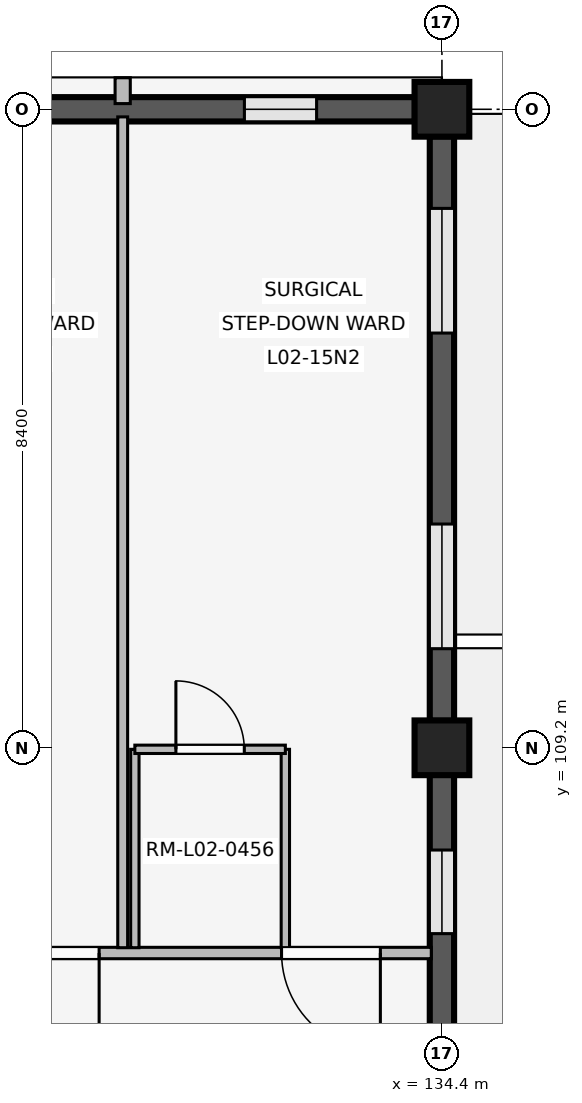
"""IFC4 building model, lengths in metres.
Left out: names, types, materials, properties, quantities, classifications, styles, units other than length and angle.
Written with IfcOpenShell. Run it as: python <this file> out.ifc"""

import sys

from ifc_helpers import new_model, si_unit, direction, frame, frame_2d, origin, origin_2d, place, context, subcontext, project, spatial, rectangle, extrude, element, fill, save


model = new_model("IFC4")
c1 = context("Model", 3, precision=1e-05, world=origin(), true_north=direction((0.0, 1.0)))
c2 = subcontext(c1, "Body", "Model", "MODEL_VIEW")
j1 = project(units=[si_unit("LENGTHUNIT", "METRE"), si_unit("PLANEANGLEUNIT", "RADIAN")], contexts=[c1])
p1 = place(None, origin())
s1 = spatial("IfcSite", under=j1, at=p1, CompositionType="ELEMENT")
p2 = place(p1, origin())
s2 = spatial("IfcBuilding", under=s1, at=p2, CompositionType="ELEMENT")
p3 = place(p2, frame((0.0, 0.0, 8.1)))
s3 = spatial("IfcBuildingStorey", under=s2, at=p3, CompositionType="ELEMENT", Elevation=8.1)
for number, where, z_axis, x_axis in (
    (1, (134.4, 109.2, 0.0), (0.0, 0.0, 1.0), (1.0, 0.0, 0.0)),
    (2, (134.4, 117.6, 0.0), (0.0, 0.0, 1.0), (1.0, 0.0, 0.0)),
):
    element("IfcColumn", number, at=place(p3, frame(where, z_axis=z_axis, x_axis=x_axis)), inside=s3, PredefinedType="COLUMN", context=c2, shape_type="SweptSolid", body=[
        extrude(rectangle(XDim=0.72, YDim=0.72, at=origin_2d()), origin(), (0.0, 0.0, 1.0), 4.8),
    ])
p4 = place(p3, frame((134.4, 108.845, 0.0), z_axis=(0.0, 0.0, 1.0), x_axis=(0.0, -1.0, 0.0)))
e3 = element("IfcWall", 3, at=p4, inside=s3, PredefinedType="SOLIDWALL", context=c2, shape_type="SweptSolid", body=[
    extrude(rectangle(XDim=7.69, YDim=0.32, at=frame_2d((3.845, 0.0))), origin(), (0.0, 0.0, 1.0), 3.86),
])
p5 = place(p4, frame((0.99, 0.0, 0.85)))
e4 = element("IfcOpeningElement", 4, at=p5, cuts=e3, PredefinedType="OPENING", context=c2, shape_type="SweptSolid", body=[
    extrude(rectangle(XDim=1.1, YDim=1.6, at=frame_2d((0.55, 0.8))), frame((0.0, 0.17, 0.0), z_axis=(0.0, -1.0, 0.0), x_axis=(1.0, 0.0, 0.0)), (0.0, 0.0, 1.0), 0.34),
])
p6 = place(p4, frame((5.6, 0.0, 0.85)))
e5 = element("IfcOpeningElement", 5, at=p6, cuts=e3, PredefinedType="OPENING", context=c2, shape_type="SweptSolid", body=[
    extrude(rectangle(XDim=1.1, YDim=1.6, at=frame_2d((0.55, 0.8))), frame((0.0, 0.17, 0.0), z_axis=(0.0, -1.0, 0.0), x_axis=(1.0, 0.0, 0.0)), (0.0, 0.0, 1.0), 0.34),
])
p7 = place(p3, frame((126.355, 117.6, 0.0), z_axis=(0.0, 0.0, 1.0), x_axis=(1.0, 0.0, 0.0)))
e6 = element("IfcWall", 6, at=p7, inside=s3, PredefinedType="SOLIDWALL", context=c2, shape_type="SweptSolid", body=[
    extrude(rectangle(XDim=7.69, YDim=0.32, at=frame_2d((3.845, 0.0))), origin(), (0.0, 0.0, 1.0), 3.86),
])
p8 = place(p7, frame((1.294, 0.0, 0.85)))
e7 = element("IfcOpeningElement", 7, at=p8, cuts=e6, PredefinedType="OPENING", context=c2, shape_type="SweptSolid", body=[
    extrude(rectangle(XDim=0.95, YDim=1.6, at=frame_2d((0.475, 0.8))), frame((0.0, 0.17, 0.0), z_axis=(0.0, -1.0, 0.0), x_axis=(1.0, 0.0, 0.0)), (0.0, 0.0, 1.0), 0.34),
])
p9 = place(p7, frame((5.446, 0.0, 0.85)))
e8 = element("IfcOpeningElement", 8, at=p9, cuts=e6, PredefinedType="OPENING", context=c2, shape_type="SweptSolid", body=[
    extrude(rectangle(XDim=0.95, YDim=1.6, at=frame_2d((0.475, 0.8))), frame((0.0, 0.17, 0.0), z_axis=(0.0, -1.0, 0.0), x_axis=(1.0, 0.0, 0.0)), (0.0, 0.0, 1.0), 0.34),
])
p10 = place(p3, frame((130.2, 117.675, 0.0), z_axis=(0.0, 0.0, 1.0), x_axis=(0.0, 1.0, 0.0)))
e9 = element("IfcWall", 9, at=p10, inside=s3, PredefinedType="ELEMENTEDWALL", context=c2, shape_type="SweptSolid", body=[
    extrude(rectangle(XDim=0.34, YDim=0.2, at=frame_2d((0.17, 0.0))), origin(), (0.0, 0.0, 1.0), 3.84),
])
p11 = place(p3, frame((134.4, 117.245, 0.0), z_axis=(0.0, 0.0, 1.0), x_axis=(0.0, -1.0, 0.0)))
e10 = element("IfcWall", 10, at=p11, inside=s3, PredefinedType="SOLIDWALL", context=c2, shape_type="SweptSolid", body=[
    extrude(rectangle(XDim=7.69, YDim=0.32, at=frame_2d((3.845, 0.0))), origin(), (0.0, 0.0, 1.0), 3.86),
])
p12 = place(p11, frame((0.949, 0.0, 0.85)))
e11 = element("IfcOpeningElement", 11, at=p12, cuts=e10, PredefinedType="OPENING", context=c2, shape_type="SweptSolid", body=[
    extrude(rectangle(XDim=1.64, YDim=1.75, at=frame_2d((0.82, 0.875))), frame((0.0, 0.17, 0.0), z_axis=(0.0, -1.0, 0.0), x_axis=(1.0, 0.0, 0.0)), (0.0, 0.0, 1.0), 0.34),
])
p13 = place(p11, frame((5.101, 0.0, 0.85)))
e12 = element("IfcOpeningElement", 12, at=p13, cuts=e10, PredefinedType="OPENING", context=c2, shape_type="SweptSolid", body=[
    extrude(rectangle(XDim=1.64, YDim=1.75, at=frame_2d((0.82, 0.875))), frame((0.0, 0.17, 0.0), z_axis=(0.0, -1.0, 0.0), x_axis=(1.0, 0.0, 0.0)), (0.0, 0.0, 1.0), 0.34),
])
p14 = place(p3, frame((134.26, 106.5, 0.0), z_axis=(0.0, 0.0, 1.0), x_axis=(-1.0, 0.0, 0.0)))
e13 = element("IfcWall", 13, at=p14, inside=s3, PredefinedType="PARTITIONING", context=c2, shape_type="SweptSolid", body=[
    extrude(rectangle(XDim=8.18, YDim=0.15, at=frame_2d((4.09, 0.0))), origin(), (0.0, 0.0, 1.0), 3.84),
])
p15 = place(p14, frame((0.67, 0.0, 0.0)))
e14 = element("IfcOpeningElement", 14, at=p15, cuts=e13, PredefinedType="OPENING", context=c2, shape_type="SweptSolid", body=[
    extrude(rectangle(XDim=1.3, YDim=2.25, at=frame_2d((0.65, 1.125))), frame((0.0, 0.085, 0.0), z_axis=(0.0, -1.0, 0.0), x_axis=(1.0, 0.0, 0.0)), (0.0, 0.0, 1.0), 0.17),
])
p16 = place(p14, frame((4.37, 0.0, 0.0)))
e15 = element("IfcOpeningElement", 15, at=p16, cuts=e13, PredefinedType="OPENING", context=c2, shape_type="SweptSolid", body=[
    extrude(rectangle(XDim=1.3, YDim=2.25, at=frame_2d((0.65, 1.125))), frame((0.0, 0.085, 0.0), z_axis=(0.0, -1.0, 0.0), x_axis=(1.0, 0.0, 0.0)), (0.0, 0.0, 1.0), 0.17),
])
p17 = place(p3, frame((130.2, 106.57, 0.0), z_axis=(0.0, 0.0, 1.0), x_axis=(0.0, 1.0, 0.0)))
e16 = element("IfcWall", 16, at=p17, inside=s3, PredefinedType="PARTITIONING", context=c2, shape_type="SweptSolid", body=[
    extrude(rectangle(XDim=10.93, YDim=0.13, at=frame_2d((5.465, 0.0))), origin(), (0.0, 0.0, 1.0), 3.84),
])
for number, where, z_axis, x_axis in (
    (17, (130.36, 106.57, 0.0), (0.0, 0.0, 1.0), (0.0, 1.0, 0.0)),
    (18, (132.34, 106.57, 0.0), (0.0, 0.0, 1.0), (0.0, 1.0, 0.0)),
):
    element("IfcWall", number, at=place(p3, frame(where, z_axis=z_axis, x_axis=x_axis)), inside=s3, PredefinedType="PARTITIONING", context=c2, shape_type="SweptSolid", body=[
        extrude(rectangle(XDim=2.61, YDim=0.11, at=frame_2d((1.305, 0.0))), origin(), (0.0, 0.0, 1.0), 3.84),
    ])
p18 = place(p3, frame((130.36, 109.18, 0.0), z_axis=(0.0, 0.0, 1.0), x_axis=(1.0, 0.0, 0.0)))
e19 = element("IfcWall", 19, at=p18, inside=s3, PredefinedType="PARTITIONING", context=c2, shape_type="SweptSolid", body=[
    extrude(rectangle(XDim=1.98, YDim=0.11, at=frame_2d((0.99, 0.0))), origin(), (0.0, 0.0, 1.0), 3.84),
])
p19 = place(p18, frame((0.54, 0.0, 0.0)))
e20 = element("IfcOpeningElement", 20, at=p19, cuts=e19, PredefinedType="OPENING", context=c2, shape_type="SweptSolid", body=[
    extrude(rectangle(XDim=0.9, YDim=2.1, at=frame_2d((0.45, 1.05))), frame((0.0, 0.065, 0.0), z_axis=(0.0, -1.0, 0.0), x_axis=(1.0, 0.0, 0.0)), (0.0, 0.0, 1.0), 0.13),
])
p20 = place(p5, origin())
e21 = element("IfcWindow", 21, at=p20, inside=s3, PartitioningType="SINGLE_PANEL", PredefinedType="WINDOW", context=c2, shape_type="SweptSolid", body=[
    extrude(rectangle(XDim=1.1, YDim=1.6, at=frame_2d((0.55, 0.8))), frame((0.0, 0.03, 0.0), z_axis=(0.0, -1.0, 0.0), x_axis=(1.0, 0.0, 0.0)), (0.0, 0.0, 1.0), 0.06),
])
fill(e4, e21)
p21 = place(p9, origin())
e22 = element("IfcWindow", 22, at=p21, inside=s3, PartitioningType="SINGLE_PANEL", PredefinedType="WINDOW", context=c2, shape_type="SweptSolid", body=[
    extrude(rectangle(XDim=0.95, YDim=1.6, at=frame_2d((0.475, 0.8))), frame((0.0, 0.03, 0.0), z_axis=(0.0, -1.0, 0.0), x_axis=(1.0, 0.0, 0.0)), (0.0, 0.0, 1.0), 0.06),
])
fill(e8, e22)
p22 = place(p12, origin())
e23 = element("IfcWindow", 23, at=p22, inside=s3, PartitioningType="SINGLE_PANEL", PredefinedType="WINDOW", context=c2, shape_type="SweptSolid", body=[
    extrude(rectangle(XDim=1.64, YDim=1.75, at=frame_2d((0.82, 0.875))), frame((0.0, 0.03, 0.0), z_axis=(0.0, -1.0, 0.0), x_axis=(1.0, 0.0, 0.0)), (0.0, 0.0, 1.0), 0.06),
])
fill(e11, e23)
p23 = place(p13, origin())
e24 = element("IfcWindow", 24, at=p23, inside=s3, PartitioningType="SINGLE_PANEL", PredefinedType="WINDOW", context=c2, shape_type="SweptSolid", body=[
    extrude(rectangle(XDim=1.64, YDim=1.75, at=frame_2d((0.82, 0.875))), frame((0.0, 0.03, 0.0), z_axis=(0.0, -1.0, 0.0), x_axis=(1.0, 0.0, 0.0)), (0.0, 0.0, 1.0), 0.06),
])
fill(e12, e24)
p24 = place(p15, origin())
e25 = element("IfcDoor", 25, at=p24, inside=s3, OperationType="SINGLE_SWING_LEFT", PredefinedType="DOOR", context=c2, shape_type="SweptSolid", body=[
    extrude(rectangle(XDim=1.3, YDim=2.25, at=frame_2d((0.65, 1.125))), frame((0.0, 0.025, 0.0), z_axis=(0.0, -1.0, 0.0), x_axis=(1.0, 0.0, 0.0)), (0.0, 0.0, 1.0), 0.05),
])
fill(e14, e25)
p25 = place(p16, origin())
e26 = element("IfcDoor", 26, at=p25, inside=s3, OperationType="SINGLE_SWING_LEFT", PredefinedType="DOOR", context=c2, shape_type="SweptSolid", body=[
    extrude(rectangle(XDim=1.3, YDim=2.25, at=frame_2d((0.65, 1.125))), frame((0.0, 0.025, 0.0), z_axis=(0.0, -1.0, 0.0), x_axis=(1.0, 0.0, 0.0)), (0.0, 0.0, 1.0), 0.05),
])
fill(e15, e26)
p26 = place(p19, origin())
e27 = element("IfcDoor", 27, at=p26, inside=s3, OperationType="SINGLE_SWING_LEFT", PredefinedType="DOOR", context=c2, shape_type="SweptSolid", body=[
    extrude(rectangle(XDim=0.9, YDim=2.1, at=frame_2d((0.45, 1.05))), frame((0.0, 0.025, 0.0), z_axis=(0.0, -1.0, 0.0), x_axis=(1.0, 0.0, 0.0)), (0.0, 0.0, 1.0), 0.05),
])
fill(e20, e27)
save(model, sys.argv[1])
